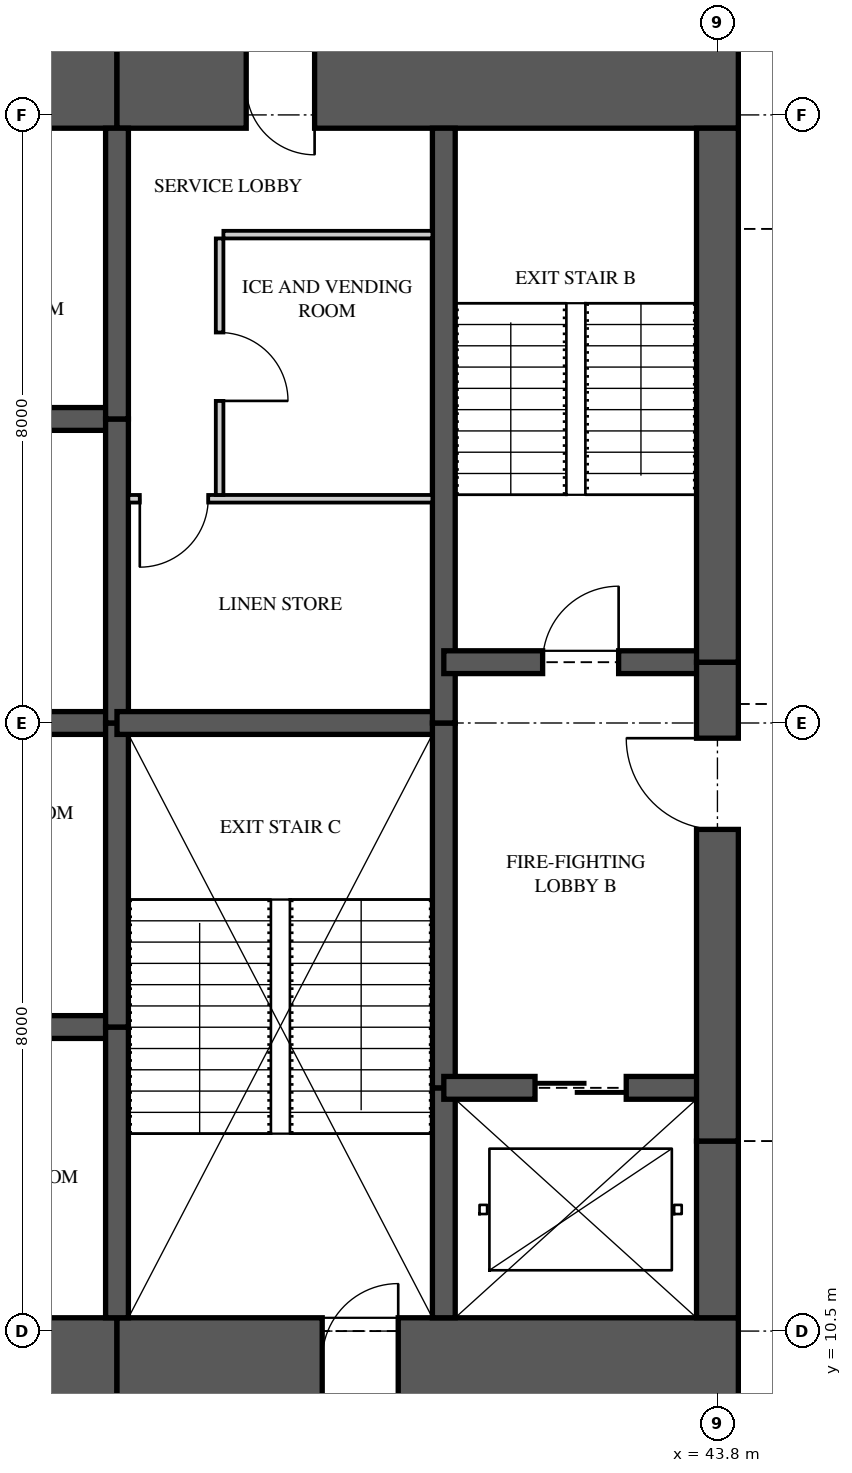
"""IFC4 building model, lengths in metres.
Left out: names, types, materials, properties, quantities, classifications, styles, units other than length and angle.
Written with IfcOpenShell. Run it as: python <this file> out.ifc"""

import sys

from ifc_helpers import new_model, si_unit, direction, frame, frame_2d, origin, place, context, subcontext, project, spatial, rectangle, extrude, element, fill, save


model = new_model("IFC4")
c1 = context("Model", 3, precision=1e-05, world=origin(), true_north=direction((0.0, 1.0)))
c2 = subcontext(c1, "Body", "Model", "MODEL_VIEW")
j1 = project(units=[si_unit("LENGTHUNIT", "METRE"), si_unit("PLANEANGLEUNIT", "RADIAN")], contexts=[c1])
p1 = place(None, origin())
s1 = spatial("IfcSite", under=j1, at=p1, CompositionType="ELEMENT")
p2 = place(p1, origin())
s2 = spatial("IfcBuilding", under=s1, at=p2, CompositionType="ELEMENT")
p3 = place(p2, frame((0.0, 0.0, 245.95)))
s3 = spatial("IfcBuildingStorey", under=s2, at=p3, CompositionType="ELEMENT", Elevation=245.95)
p4 = place(p3, frame((31.6, 10.125, 0.0), z_axis=(0.0, 0.0, 1.0), x_axis=(1.0, 0.0, 0.0)))
e1 = element("IfcWall", 1, at=p4, inside=s3, PredefinedType="SHEAR", context=c2, shape_type="SweptSolid", body=[
    extrude(rectangle(XDim=4.3, YDim=1.1, at=frame_2d((2.15, 0.0))), origin(), (0.0, 0.0, 1.0), 3.5),
])
p5 = place(p3, frame((35.9, 10.125, 0.0), z_axis=(0.0, 0.0, 1.0), x_axis=(1.0, 0.0, 0.0)))
e2 = element("IfcWall", 2, at=p5, inside=s3, PredefinedType="SHEAR", context=c2, shape_type="SweptSolid", body=[
    extrude(rectangle(XDim=8.175, YDim=1.1, at=frame_2d((4.087, 0.0))), origin(), (0.0, 0.0, 1.0), 3.5),
])
p6 = place(p5, frame((2.7, 0.0, 0.0)))
e3 = element("IfcOpeningElement", 3, at=p6, cuts=e2, PredefinedType="OPENING", context=c2, shape_type="SweptSolid", body=[
    extrude(rectangle(XDim=1.0, YDim=2.1, at=frame_2d((0.5, 1.05))), frame((0.0, 0.56, 0.0), z_axis=(0.0, -1.0, 0.0), x_axis=(1.0, 0.0, 0.0)), (0.0, 0.0, 1.0), 1.12),
])
p7 = place(p3, frame((44.075, 26.875, 0.0), z_axis=(0.0, 0.0, 1.0), x_axis=(-1.0, 0.0, 0.0)))
e4 = element("IfcWall", 4, at=p7, inside=s3, PredefinedType="SHEAR", context=c2, shape_type="SweptSolid", body=[
    extrude(rectangle(XDim=8.175, YDim=1.1, at=frame_2d((4.087, 0.0))), origin(), (0.0, 0.0, 1.0), 3.5),
])
p8 = place(p7, frame((5.575, 0.0, 0.0)))
e5 = element("IfcOpeningElement", 5, at=p8, cuts=e4, PredefinedType="OPENING", context=c2, shape_type="SweptSolid", body=[
    extrude(rectangle(XDim=0.9, YDim=2.1, at=frame_2d((0.45, 1.05))), frame((0.0, 0.56, 0.0), z_axis=(0.0, -1.0, 0.0), x_axis=(1.0, 0.0, 0.0)), (0.0, 0.0, 1.0), 1.12),
])
p9 = place(p3, frame((35.9, 26.875, 0.0), z_axis=(0.0, 0.0, 1.0), x_axis=(-1.0, 0.0, 0.0)))
e6 = element("IfcWall", 6, at=p9, inside=s3, PredefinedType="SHEAR", context=c2, shape_type="SweptSolid", body=[
    extrude(rectangle(XDim=4.3, YDim=1.1, at=frame_2d((2.15, 0.0))), origin(), (0.0, 0.0, 1.0), 3.5),
])
p10 = place(p3, frame((43.8, 10.675, 0.0), z_axis=(0.0, 0.0, 1.0), x_axis=(0.0, 1.0, 0.0)))
e7 = element("IfcWall", 7, at=p10, inside=s3, PredefinedType="SHEAR", context=c2, shape_type="SweptSolid", body=[
    extrude(rectangle(XDim=2.325, YDim=0.55, at=frame_2d((1.163, 0.0))), origin(), (0.0, 0.0, 1.0), 3.5),
])
p11 = place(p3, frame((43.8, 13.0, 0.0), z_axis=(0.0, 0.0, 1.0), x_axis=(0.0, 1.0, 0.0)))
e8 = element("IfcWall", 8, at=p11, inside=s3, PredefinedType="SHEAR", context=c2, shape_type="SweptSolid", body=[
    extrude(rectangle(XDim=6.3, YDim=0.55, at=frame_2d((3.15, 0.0))), origin(), (0.0, 0.0, 1.0), 3.5),
])
p12 = place(p11, frame((4.1, 0.0, 0.0)))
e9 = element("IfcOpeningElement", 9, at=p12, cuts=e8, PredefinedType="OPENING", context=c2, shape_type="SweptSolid", body=[
    extrude(rectangle(XDim=1.2, YDim=2.2, at=frame_2d((0.6, 1.1))), frame((0.0, 0.285, 0.0), z_axis=(0.0, -1.0, 0.0), x_axis=(1.0, 0.0, 0.0)), (0.0, 0.0, 1.0), 0.57),
])
p13 = place(p3, frame((43.8, 19.3, 0.0), z_axis=(0.0, 0.0, 1.0), x_axis=(0.0, 1.0, 0.0)))
e10 = element("IfcWall", 10, at=p13, inside=s3, PredefinedType="SHEAR", context=c2, shape_type="SweptSolid", body=[
    extrude(rectangle(XDim=7.025, YDim=0.55, at=frame_2d((3.512, 0.0))), origin(), (0.0, 0.0, 1.0), 3.5),
])
p14 = place(p3, frame((35.9, 10.675, 0.0), z_axis=(0.0, 0.0, 1.0), x_axis=(0.0, 1.0, 0.0)))
e11 = element("IfcWall", 11, at=p14, inside=s3, PredefinedType="SHEAR", context=c2, shape_type="SweptSolid", body=[
    extrude(rectangle(XDim=3.825, YDim=0.3, at=frame_2d((1.913, 0.0))), origin(), (0.0, 0.0, 1.0), 3.5),
])
for number, where, z_axis, x_axis in (
    (12, (35.9, 14.5, 0.0), (0.0, 0.0, 1.0), (0.0, 1.0, 0.0)),
    (13, (35.9, 18.5, 0.0), (0.0, 0.0, 1.0), (0.0, 1.0, 0.0)),
):
    element("IfcWall", number, at=place(p3, frame(where, z_axis=z_axis, x_axis=x_axis)), inside=s3, PredefinedType="SHEAR", context=c2, shape_type="SweptSolid", body=[
        extrude(rectangle(XDim=4.0, YDim=0.3, at=frame_2d((2.0, 0.0))), origin(), (0.0, 0.0, 1.0), 3.5),
    ])
p15 = place(p3, frame((35.9, 22.5, 0.0), z_axis=(0.0, 0.0, 1.0), x_axis=(0.0, 1.0, 0.0)))
e14 = element("IfcWall", 14, at=p15, inside=s3, PredefinedType="SHEAR", context=c2, shape_type="SweptSolid", body=[
    extrude(rectangle(XDim=3.825, YDim=0.3, at=frame_2d((1.913, 0.0))), origin(), (0.0, 0.0, 1.0), 3.5),
])
p16 = place(p3, frame((40.2, 10.675, 0.0), z_axis=(0.0, 0.0, 1.0), x_axis=(0.0, 1.0, 0.0)))
e15 = element("IfcWall", 15, at=p16, inside=s3, PredefinedType="SHEAR", context=c2, shape_type="SweptSolid", body=[
    extrude(rectangle(XDim=3.025, YDim=0.3, at=frame_2d((1.512, 0.0))), origin(), (0.0, 0.0, 1.0), 3.5),
])
p17 = place(p3, frame((40.2, 13.7, 0.0), z_axis=(0.0, 0.0, 1.0), x_axis=(0.0, 1.0, 0.0)))
e16 = element("IfcWall", 16, at=p17, inside=s3, PredefinedType="SHEAR", context=c2, shape_type="SweptSolid", body=[
    extrude(rectangle(XDim=4.8, YDim=0.3, at=frame_2d((2.4, 0.0))), origin(), (0.0, 0.0, 1.0), 3.5),
])
p18 = place(p3, frame((40.2, 18.5, 0.0), z_axis=(0.0, 0.0, 1.0), x_axis=(0.0, 1.0, 0.0)))
e17 = element("IfcWall", 17, at=p18, inside=s3, PredefinedType="SHEAR", context=c2, shape_type="SweptSolid", body=[
    extrude(rectangle(XDim=7.825, YDim=0.3, at=frame_2d((3.913, 0.0))), origin(), (0.0, 0.0, 1.0), 3.5),
])
for number, where, z_axis, x_axis in (
    (18, (31.6, 14.5, 0.0), (0.0, 0.0, 1.0), (1.0, 0.0, 0.0)),
    (19, (31.6, 18.5, 0.0), (0.0, 0.0, 1.0), (1.0, 0.0, 0.0)),
    (20, (31.6, 22.5, 0.0), (0.0, 0.0, 1.0), (1.0, 0.0, 0.0)),
):
    element("IfcWall", number, at=place(p3, frame(where, z_axis=z_axis, x_axis=x_axis)), inside=s3, PredefinedType="SHEAR", context=c2, shape_type="SweptSolid", body=[
        extrude(rectangle(XDim=4.3, YDim=0.3, at=frame_2d((2.15, 0.0))), origin(), (0.0, 0.0, 1.0), 3.5),
    ])
p19 = place(p3, frame((35.9, 18.5, 0.0), z_axis=(0.0, 0.0, 1.0), x_axis=(1.0, 0.0, 0.0)))
e21 = element("IfcWall", 21, at=p19, inside=s3, PredefinedType="SHEAR", context=c2, shape_type="SweptSolid", body=[
    extrude(rectangle(XDim=4.3, YDim=0.3, at=frame_2d((2.15, 0.0))), origin(), (0.0, 0.0, 1.0), 3.5),
])
p20 = place(p3, frame((40.2, 13.7, 0.0), z_axis=(0.0, 0.0, 1.0), x_axis=(1.0, 0.0, 0.0)))
e22 = element("IfcWall", 22, at=p20, inside=s3, PredefinedType="SHEAR", context=c2, shape_type="SweptSolid", body=[
    extrude(rectangle(XDim=3.6, YDim=0.3, at=frame_2d((1.8, 0.0))), origin(), (0.0, 0.0, 1.0), 3.5),
])
p21 = place(p20, frame((1.2, 0.0, 0.0)))
e23 = element("IfcOpeningElement", 23, at=p21, cuts=e22, PredefinedType="OPENING", context=c2, shape_type="SweptSolid", body=[
    extrude(rectangle(XDim=1.2, YDim=2.1, at=frame_2d((0.6, 1.05))), frame((0.0, 0.16, 0.0), z_axis=(0.0, -1.0, 0.0), x_axis=(1.0, 0.0, 0.0)), (0.0, 0.0, 1.0), 0.32),
])
p22 = place(p3, frame((40.2, 19.3, 0.0), z_axis=(0.0, 0.0, 1.0), x_axis=(1.0, 0.0, 0.0)))
e24 = element("IfcWall", 24, at=p22, inside=s3, PredefinedType="SHEAR", context=c2, shape_type="SweptSolid", body=[
    extrude(rectangle(XDim=3.6, YDim=0.3, at=frame_2d((1.8, 0.0))), origin(), (0.0, 0.0, 1.0), 3.5),
])
p23 = place(p22, frame((1.3, 0.0, 0.0)))
e25 = element("IfcOpeningElement", 25, at=p23, cuts=e24, PredefinedType="OPENING", context=c2, shape_type="SweptSolid", body=[
    extrude(rectangle(XDim=1.0, YDim=2.1, at=frame_2d((0.5, 1.05))), frame((0.0, 0.16, 0.0), z_axis=(0.0, -1.0, 0.0), x_axis=(1.0, 0.0, 0.0)), (0.0, 0.0, 1.0), 0.32),
])
p24 = place(p3, frame((37.3, 24.925, 0.0), z_axis=(0.0, 0.0, 1.0), x_axis=(1.0, 0.0, 0.0)))
e26 = element("IfcWall", 26, at=p24, inside=s3, PredefinedType="PARTITIONING", context=c2, shape_type="SweptSolid", body=[
    extrude(rectangle(XDim=2.75, YDim=0.1, at=frame_2d((1.375, 0.0))), origin(), (0.0, 0.0, 1.0), 3.26),
])
p25 = place(p3, frame((37.25, 21.5, 0.0), z_axis=(0.0, 0.0, 1.0), x_axis=(0.0, 1.0, 0.0)))
e27 = element("IfcWall", 27, at=p25, inside=s3, PredefinedType="PARTITIONING", context=c2, shape_type="SweptSolid", body=[
    extrude(rectangle(XDim=3.375, YDim=0.1, at=frame_2d((1.688, 0.0))), origin(), (0.0, 0.0, 1.0), 3.26),
])
p26 = place(p25, frame((1.238, 0.0, 0.0)))
e28 = element("IfcOpeningElement", 28, at=p26, cuts=e27, PredefinedType="OPENING", context=c2, shape_type="SweptSolid", body=[
    extrude(rectangle(XDim=0.9, YDim=2.1, at=frame_2d((0.45, 1.05))), frame((0.0, 0.06, 0.0), z_axis=(0.0, -1.0, 0.0), x_axis=(1.0, 0.0, 0.0)), (0.0, 0.0, 1.0), 0.12),
])
p27 = place(p3, frame((36.05, 21.45, 0.0), z_axis=(0.0, 0.0, 1.0), x_axis=(1.0, 0.0, 0.0)))
e29 = element("IfcWall", 29, at=p27, inside=s3, PredefinedType="PARTITIONING", context=c2, shape_type="SweptSolid", body=[
    extrude(rectangle(XDim=4.0, YDim=0.1, at=frame_2d((2.0, 0.0))), origin(), (0.0, 0.0, 1.0), 3.26),
])
p28 = place(p27, frame((0.15, 0.0, 0.0)))
e30 = element("IfcOpeningElement", 30, at=p28, cuts=e29, PredefinedType="OPENING", context=c2, shape_type="SweptSolid", body=[
    extrude(rectangle(XDim=0.9, YDim=2.1, at=frame_2d((0.45, 1.05))), frame((0.0, 0.06, 0.0), z_axis=(0.0, -1.0, 0.0), x_axis=(1.0, 0.0, 0.0)), (0.0, 0.0, 1.0), 0.12),
])
p29 = place(p26, frame((0.9, 0.0, 0.0), z_axis=(0.0, 0.0, 1.0), x_axis=(-1.0, 0.0, 0.0)))
e31 = element("IfcDoor", 31, at=p29, inside=s3, OperationType="SINGLE_SWING_RIGHT", PredefinedType="DOOR", context=c2, shape_type="SweptSolid", body=[
    extrude(rectangle(XDim=0.9, YDim=2.1, at=frame_2d((0.45, 1.05))), frame((0.0, 0.025, 0.0), z_axis=(0.0, -1.0, 0.0), x_axis=(1.0, 0.0, 0.0)), (0.0, 0.0, 1.0), 0.05),
])
fill(e28, e31)
p30 = place(p28, frame((0.9, 0.0, 0.0), z_axis=(0.0, 0.0, 1.0), x_axis=(-1.0, 0.0, 0.0)))
e32 = element("IfcDoor", 32, at=p30, inside=s3, OperationType="SINGLE_SWING_RIGHT", PredefinedType="DOOR", context=c2, shape_type="SweptSolid", body=[
    extrude(rectangle(XDim=0.9, YDim=2.1, at=frame_2d((0.45, 1.05))), frame((0.0, 0.025, 0.0), z_axis=(0.0, -1.0, 0.0), x_axis=(1.0, 0.0, 0.0)), (0.0, 0.0, 1.0), 0.05),
])
fill(e30, e32)
p31 = place(p23, origin())
e33 = element("IfcDoor", 33, at=p31, inside=s3, OperationType="SINGLE_SWING_RIGHT", PredefinedType="DOOR", context=c2, shape_type="SweptSolid", body=[
    extrude(rectangle(XDim=1.0, YDim=2.1, at=frame_2d((0.5, 1.05))), frame((0.0, 0.025, 0.0), z_axis=(0.0, -1.0, 0.0), x_axis=(1.0, 0.0, 0.0)), (0.0, 0.0, 1.0), 0.05),
])
fill(e25, e33)
p32 = place(p12, origin())
e34 = element("IfcDoor", 34, at=p32, inside=s3, OperationType="SINGLE_SWING_RIGHT", PredefinedType="DOOR", context=c2, shape_type="SweptSolid", body=[
    extrude(rectangle(XDim=1.2, YDim=2.2, at=frame_2d((0.6, 1.1))), frame((0.0, 0.025, 0.0), z_axis=(0.0, -1.0, 0.0), x_axis=(1.0, 0.0, 0.0)), (0.0, 0.0, 1.0), 0.05),
])
fill(e9, e34)
p33 = place(p21, origin())
e35 = element("IfcDoor", 35, at=p33, inside=s3, OperationType="SLIDING_TO_LEFT", PredefinedType="DOOR", context=c2, shape_type="SweptSolid", body=[
    extrude(rectangle(XDim=1.2, YDim=2.1, at=frame_2d((0.6, 1.05))), frame((0.0, 0.025, 0.0), z_axis=(0.0, -1.0, 0.0), x_axis=(1.0, 0.0, 0.0)), (0.0, 0.0, 1.0), 0.05),
])
fill(e23, e35)
p34 = place(p6, origin())
e36 = element("IfcDoor", 36, at=p34, inside=s3, OperationType="SINGLE_SWING_RIGHT", PredefinedType="DOOR", context=c2, shape_type="SweptSolid", body=[
    extrude(rectangle(XDim=1.0, YDim=2.1, at=frame_2d((0.5, 1.05))), frame((0.0, 0.025, 0.0), z_axis=(0.0, -1.0, 0.0), x_axis=(1.0, 0.0, 0.0)), (0.0, 0.0, 1.0), 0.05),
])
fill(e3, e36)
p35 = place(p8, origin())
e37 = element("IfcDoor", 37, at=p35, inside=s3, OperationType="SINGLE_SWING_LEFT", PredefinedType="DOOR", context=c2, shape_type="SweptSolid", body=[
    extrude(rectangle(XDim=0.9, YDim=2.1, at=frame_2d((0.45, 1.05))), frame((0.0, 0.47, 0.0), z_axis=(0.0, -1.0, 0.0), x_axis=(1.0, 0.0, 0.0)), (0.0, 0.0, 1.0), 0.8),
])
fill(e5, e37)
save(model, sys.argv[1])
